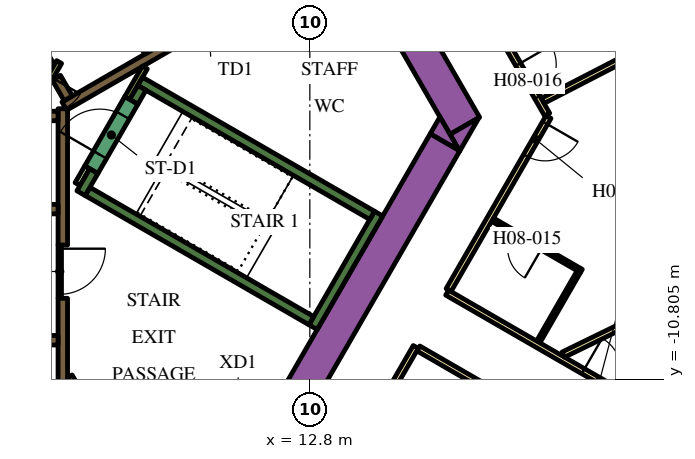
"""IFC4 building model, lengths in metres.
Left out: names, types, materials, properties, quantities, classifications, styles, units other than length and angle.
Written with IfcOpenShell. Run it as: python <this file> out.ifc"""

import sys

from ifc_helpers import new_model, si_unit, direction, frame, frame_2d, origin, place, context, subcontext, project, spatial, polyline, rectangle, outline, extrude, element, fill, save


model = new_model("IFC4")
c1 = context("Model", 3, precision=1e-05, world=origin(), true_north=direction((0.0, 1.0)))
c2 = subcontext(c1, "Body", "Model", "MODEL_VIEW")
j1 = project(units=[si_unit("LENGTHUNIT", "METRE"), si_unit("PLANEANGLEUNIT", "RADIAN")], contexts=[c1])
p1 = place(None, origin())
s1 = spatial("IfcSite", under=j1, at=p1, CompositionType="ELEMENT")
p2 = place(p1, origin())
s2 = spatial("IfcBuilding", under=s1, at=p2, CompositionType="ELEMENT")
p3 = place(p2, frame((0.0, 0.0, 114.9)))
s3 = spatial("IfcBuildingStorey", under=s2, at=p3, CompositionType="ELEMENT", Elevation=114.9)
p4 = place(p3, frame((6.776, 13.364, 0.0), z_axis=(0.0, 0.0, 1.0), x_axis=(0.500004177138, -0.8660229921, 0.0)))
e1 = element("IfcWall", 1, at=p4, inside=s3, PredefinedType="SOLIDWALL", context=c2, shape_type="SweptSolid", body=[
    extrude(rectangle(XDim=20.204, YDim=0.9, at=frame_2d((10.102, 0.0))), origin(), (0.0, 0.0, 1.0), 3.9),
])
p5 = place(p3, origin())
e2 = element("IfcWall", 2, at=p5, inside=s3, PredefinedType="SOLIDWALL", context=c2, shape_type="SweptSolid", body=[
    extrude(outline(polyline([(16.743, -4.8), (16.489, -4.36), (17.251, -3.92), (16.743, -4.8)])), origin(), (0.0, 0.0, 1.0), 3.9),
])
p6 = place(p3, frame((11.943, -12.214, 0.0), z_axis=(0.0, 0.0, 1.0), x_axis=(0.49998092645, 0.866036415623, 0.0)))
e3 = element("IfcWall", 3, at=p6, inside=s3, PredefinedType="SOLIDWALL", context=c2, shape_type="SweptSolid", body=[
    extrude(rectangle(XDim=8.83, YDim=0.9, at=frame_2d((4.415, 0.0))), origin(), (0.0, 0.0, 1.0), 3.9),
])
e4 = element("IfcWall", 4, at=p5, inside=s3, PredefinedType="SOLIDWALL", context=c2, shape_type="SweptSolid", body=[
    extrude(outline(polyline([(16.223, -3.9), (16.732, -4.78), (15.969, -4.34), (16.223, -3.9)])), origin(), (0.0, 0.0, 1.0), 3.9),
])
p7 = place(p3, frame((12.885, -9.431, 0.0), z_axis=(0.0, 0.0, 1.0), x_axis=(0.500020560727, 0.866013532718, 0.0)))
e5 = element("IfcWall", 5, at=p7, inside=s3, PredefinedType="SOLIDWALL", context=c2, shape_type="SweptSolid", body=[
    extrude(rectangle(XDim=3.45, YDim=0.25, at=frame_2d((1.725, 0.0))), origin(), (0.0, 0.0, 1.0), 3.9),
])
p8 = place(p3, frame((12.84, -9.261, 0.0), z_axis=(0.0, 0.0, 1.0), x_axis=(-0.866013990052, 0.500019768644, 0.0)))
e6 = element("IfcWall", 6, at=p8, inside=s3, PredefinedType="SOLIDWALL", context=c2, shape_type="SweptSolid", body=[
    extrude(rectangle(XDim=6.8, YDim=0.25, at=frame_2d((3.4, 0.0))), origin(), (0.0, 0.0, 1.0), 3.9),
])
p9 = place(p3, frame((6.78, -5.906, 0.0), z_axis=(0.0, 0.0, 1.0), x_axis=(0.500223362819, 0.865896406789, 0.0)))
e7 = element("IfcWall", 7, at=p9, inside=s3, PredefinedType="SOLIDWALL", context=c2, shape_type="SweptSolid", body=[
    extrude(rectangle(XDim=0.675, YDim=0.25, at=frame_2d((0.337, 0.0))), origin(), (0.0, 0.0, 1.0), 3.9),
])
p10 = place(p3, frame((8.334, -2.964, 0.0), z_axis=(0.0, 0.0, 1.0), x_axis=(0.866016039709, -0.500016218704, 0.0)))
e8 = element("IfcWall", 8, at=p10, inside=s3, PredefinedType="SOLIDWALL", context=c2, shape_type="SweptSolid", body=[
    extrude(rectangle(XDim=7.05, YDim=0.25, at=frame_2d((3.525, 0.0))), origin(), (0.0, 0.0, 1.0), 3.9),
])
p11 = place(p3, frame((8.168, -3.503, 0.0), z_axis=(0.0, 0.0, 1.0), x_axis=(0.49972245349, 0.866185586049, 0.0)))
e9 = element("IfcWall", 9, at=p11, inside=s3, PredefinedType="SOLIDWALL", context=c2, shape_type="SweptSolid", body=[
    extrude(rectangle(XDim=0.425, YDim=0.25, at=frame_2d((0.212, 0.0))), origin(), (0.0, 0.0, 1.0), 3.9),
])
p12 = place(p3, frame((6.3, -7.27, 0.0), z_axis=(0.0, 0.0, 1.0), x_axis=(0.0, 1.0, 0.0)))
e10 = element("IfcWall", 10, at=p12, inside=s3, PredefinedType="SOLIDWALL", context=c2, shape_type="SweptSolid", body=[
    extrude(rectangle(XDim=3.586, YDim=0.25, at=frame_2d((1.793, 0.0))), origin(), (0.0, 0.0, 1.0), 3.9),
])
p13 = place(p3, frame((6.3, -12.1, 0.0), z_axis=(0.0, 0.0, 1.0), x_axis=(0.0, 1.0, 0.0)))
e11 = element("IfcWall", 11, at=p13, inside=s3, PredefinedType="SOLIDWALL", context=c2, shape_type="SweptSolid", body=[
    extrude(rectangle(XDim=3.428, YDim=0.25, at=frame_2d((1.714, 0.0))), origin(), (0.0, 0.0, 1.0), 3.9),
])
p14 = place(p3, frame((5.538, -3.875, 0.0), z_axis=(0.0, 0.0, 1.0), x_axis=(1.0, 0.0, 0.0)))
e12 = element("IfcWall", 12, at=p14, inside=s3, PredefinedType="SOLIDWALL", context=c2, shape_type="SweptSolid", body=[
    extrude(rectangle(XDim=0.637, YDim=0.25, at=frame_2d((0.318, 0.0))), origin(), (0.0, 0.0, 1.0), 3.9),
])
p15 = place(p3, frame((9.346, -1.879, 0.0), z_axis=(0.0, 0.0, 1.0), x_axis=(-0.866048528039, -0.499959945477, 0.0)))
e13 = element("IfcWall", 13, at=p15, inside=s3, PredefinedType="SOLIDWALL", context=c2, shape_type="SweptSolid", body=[
    extrude(rectangle(XDim=3.47, YDim=0.25, at=frame_2d((1.735, 0.0))), origin(), (0.0, 0.0, 1.0), 3.9),
])
p16 = place(p3, frame((6.13, -2.867, 0.0), z_axis=(0.0, 0.0, 1.0), x_axis=(0.500160776593, -0.865932559475, 0.0)))
e14 = element("IfcWall", 14, at=p16, inside=s3, PredefinedType="SOLIDWALL", context=c2, shape_type="SweptSolid", body=[
    extrude(rectangle(XDim=0.627, YDim=0.25, at=frame_2d((0.313, 0.0))), origin(), (0.0, 0.0, 1.0), 3.9),
])
p17 = place(p3, frame((5.97, -2.591, 0.0), z_axis=(0.0, 0.0, 1.0), x_axis=(-0.499994469932, 0.866028596547, 0.0)))
e15 = element("IfcWall", 15, at=p17, inside=s3, PredefinedType="SOLIDWALL", context=c2, shape_type="SweptSolid", body=[
    extrude(rectangle(XDim=10.488, YDim=0.25, at=frame_2d((5.244, 0.0))), origin(), (0.0, 0.0, 1.0), 3.9),
])
p18 = place(p3, frame((6.48, -10.726, 0.0), z_axis=(0.0, 0.0, 1.0), x_axis=(0.500017819788, -0.86601511528, 0.0)))
e16 = element("IfcWall", 16, at=p18, inside=s3, PredefinedType="PARTITIONING", context=c2, shape_type="SweptSolid", body=[
    extrude(rectangle(XDim=1.55, YDim=0.15, at=frame_2d((0.775, 0.0))), origin(), (0.0, 0.0, 1.0), 2.75),
])
p19 = place(p3, frame((6.945, -5.222, 0.0), z_axis=(0.0, 0.0, 1.0), x_axis=(-0.499818422106, -0.866130212453, 0.0)))
e17 = element("IfcWall", 17, at=p19, inside=s3, PredefinedType="PARTITIONING", context=c2, shape_type="SweptSolid", body=[
    extrude(rectangle(XDim=0.514, YDim=0.15, at=frame_2d((0.257, 0.0))), origin(), (0.0, 0.0, 1.0), 2.75),
])
p20 = place(p3, frame((8.459, -2.599, 0.0), z_axis=(0.0, 0.0, 1.0), x_axis=(-0.500041054325, -0.866001699761, 0.0)))
e18 = element("IfcWall", 18, at=p20, inside=s3, PredefinedType="PARTITIONING", context=c2, shape_type="SweptSolid", body=[
    extrude(rectangle(XDim=0.929, YDim=0.15, at=frame_2d((0.464, 0.0))), origin(), (0.0, 0.0, 1.0), 3.9),
])
p21 = place(p3, frame((-6.175, -9.775, 0.0), z_axis=(0.0, 0.0, 1.0), x_axis=(1.0, 0.0, 0.0)))
e19 = element("IfcWall", 19, at=p21, inside=s3, PredefinedType="SOLIDWALL", context=c2, shape_type="SweptSolid", body=[
    extrude(rectangle(XDim=12.35, YDim=0.25, at=frame_2d((6.175, 0.0))), origin(), (0.0, 0.0, 1.0), 3.9),
])
p22 = place(p21, frame((0.585, 0.0, 0.0)))
e20 = element("IfcOpeningElement", 20, at=p22, cuts=e19, PredefinedType="OPENING", context=c2, shape_type="SweptSolid", body=[
    extrude(rectangle(XDim=1.1, YDim=2.1, at=frame_2d((0.55, 1.05))), frame((0.0, 0.135, 0.0), z_axis=(0.0, -1.0, 0.0), x_axis=(1.0, 0.0, 0.0)), (0.0, 0.0, 1.0), 0.27),
])
p23 = place(p21, frame((3.105, 0.0, 0.0)))
e21 = element("IfcOpeningElement", 21, at=p23, cuts=e19, PredefinedType="OPENING", context=c2, shape_type="SweptSolid", body=[
    extrude(rectangle(XDim=1.1, YDim=2.1, at=frame_2d((0.55, 1.05))), frame((0.0, 0.135, 0.0), z_axis=(0.0, -1.0, 0.0), x_axis=(1.0, 0.0, 0.0)), (0.0, 0.0, 1.0), 0.27),
])
p24 = place(p21, frame((5.625, 0.0, 0.0)))
e22 = element("IfcOpeningElement", 22, at=p24, cuts=e19, PredefinedType="OPENING", context=c2, shape_type="SweptSolid", body=[
    extrude(rectangle(XDim=1.1, YDim=2.1, at=frame_2d((0.55, 1.05))), frame((0.0, 0.135, 0.0), z_axis=(0.0, -1.0, 0.0), x_axis=(1.0, 0.0, 0.0)), (0.0, 0.0, 1.0), 0.27),
])
p25 = place(p21, frame((8.145, 0.0, 0.0)))
e23 = element("IfcOpeningElement", 23, at=p25, cuts=e19, PredefinedType="OPENING", context=c2, shape_type="SweptSolid", body=[
    extrude(rectangle(XDim=1.1, YDim=2.1, at=frame_2d((0.55, 1.05))), frame((0.0, 0.135, 0.0), z_axis=(0.0, -1.0, 0.0), x_axis=(1.0, 0.0, 0.0)), (0.0, 0.0, 1.0), 0.27),
])
p26 = place(p21, frame((10.665, 0.0, 0.0)))
e24 = element("IfcOpeningElement", 24, at=p26, cuts=e19, PredefinedType="OPENING", context=c2, shape_type="SweptSolid", body=[
    extrude(rectangle(XDim=1.1, YDim=2.1, at=frame_2d((0.55, 1.05))), frame((0.0, 0.135, 0.0), z_axis=(0.0, -1.0, 0.0), x_axis=(1.0, 0.0, 0.0)), (0.0, 0.0, 1.0), 0.27),
])
p27 = place(p3, frame((-6.175, -6.325, 0.0), z_axis=(0.0, 0.0, 1.0), x_axis=(1.0, 0.0, 0.0)))
e25 = element("IfcWall", 25, at=p27, inside=s3, PredefinedType="SOLIDWALL", context=c2, shape_type="SweptSolid", body=[
    extrude(rectangle(XDim=12.35, YDim=0.25, at=frame_2d((6.175, 0.0))), origin(), (0.0, 0.0, 1.0), 3.9),
])
p28 = place(p27, frame((3.205, 0.0, 0.0)))
e26 = element("IfcOpeningElement", 26, at=p28, cuts=e25, PredefinedType="OPENING", context=c2, shape_type="SweptSolid", body=[
    extrude(rectangle(XDim=0.9, YDim=2.1, at=frame_2d((0.45, 1.05))), frame((0.0, 0.135, 0.0), z_axis=(0.0, -1.0, 0.0), x_axis=(1.0, 0.0, 0.0)), (0.0, 0.0, 1.0), 0.27),
])
p29 = place(p27, frame((8.145, 0.0, 0.0)))
e27 = element("IfcOpeningElement", 27, at=p29, cuts=e25, PredefinedType="OPENING", context=c2, shape_type="SweptSolid", body=[
    extrude(rectangle(XDim=1.1, YDim=2.1, at=frame_2d((0.55, 1.05))), frame((0.0, 0.135, 0.0), z_axis=(0.0, -1.0, 0.0), x_axis=(1.0, 0.0, 0.0)), (0.0, 0.0, 1.0), 0.27),
])
p30 = place(p27, frame((10.665, 0.0, 0.0)))
e28 = element("IfcOpeningElement", 28, at=p30, cuts=e25, PredefinedType="OPENING", context=c2, shape_type="SweptSolid", body=[
    extrude(rectangle(XDim=1.1, YDim=2.1, at=frame_2d((0.55, 1.05))), frame((0.0, 0.135, 0.0), z_axis=(0.0, -1.0, 0.0), x_axis=(1.0, 0.0, 0.0)), (0.0, 0.0, 1.0), 0.27),
])
p31 = place(p3, frame((8.565, -2.185, 0.0), z_axis=(0.0, 0.0, 1.0), x_axis=(-0.499997954832, 0.866026584559, 0.0)))
e29 = element("IfcWall", 29, at=p31, inside=s3, PredefinedType="SOLIDWALL", context=c2, shape_type="SweptSolid", body=[
    extrude(rectangle(XDim=12.35, YDim=0.25, at=frame_2d((6.175, 0.0))), origin(), (0.0, 0.0, 1.0), 3.9),
])
p32 = place(p31, frame((5.725, 0.0, 0.0)))
e30 = element("IfcOpeningElement", 30, at=p32, cuts=e29, PredefinedType="OPENING", context=c2, shape_type="SweptSolid", body=[
    extrude(rectangle(XDim=0.9, YDim=2.1, at=frame_2d((0.45, 1.05))), frame((0.0, 0.135, 0.0), z_axis=(0.0, -1.0, 0.0), x_axis=(1.0, 0.0, 0.0)), (0.0, 0.0, 1.0), 0.27),
])
p33 = place(p3, frame((7.053, -5.284, 0.0), z_axis=(0.0, 0.0, 1.0), x_axis=(0.500078061341, 0.865980330357, 0.0)))
e31 = element("IfcWall", 31, at=p33, inside=s3, PredefinedType="SOLIDWALL", context=c2, shape_type="SweptSolid", body=[
    extrude(rectangle(XDim=2.1, YDim=0.4, at=frame_2d((1.05, 0.0))), origin(), (0.0, 0.0, 1.0), 3.9),
])
p34 = place(p33, frame((0.45, 0.0, 0.0)))
e32 = element("IfcOpeningElement", 32, at=p34, cuts=e31, PredefinedType="OPENING", context=c2, shape_type="SweptSolid", body=[
    extrude(rectangle(XDim=1.2, YDim=2.1, at=frame_2d((0.6, 1.05))), frame((0.0, 0.21, 0.0), z_axis=(0.0, -1.0, 0.0), x_axis=(1.0, 0.0, 0.0)), (0.0, 0.0, 1.0), 0.42),
])
p35 = place(p3, frame((6.203, -2.456, 0.0), z_axis=(0.0, 0.0, 1.0), x_axis=(-0.500043961785, -0.866000020948, 0.0)))
e33 = element("IfcWall", 33, at=p35, inside=s3, PredefinedType="PARTITIONING", context=c2, shape_type="SweptSolid", body=[
    extrude(rectangle(XDim=1.95, YDim=0.15, at=frame_2d((0.975, 0.0))), origin(), (0.0, 0.0, 1.0), 3.9),
])
p36 = place(p35, frame((0.45, 0.0, 0.0)))
e34 = element("IfcOpeningElement", 34, at=p36, cuts=e33, PredefinedType="OPENING", context=c2, shape_type="SweptSolid", body=[
    extrude(rectangle(XDim=0.9, YDim=2.1, at=frame_2d((0.45, 1.05))), frame((0.0, 0.085, 0.0), z_axis=(0.0, -1.0, 0.0), x_axis=(1.0, 0.0, 0.0)), (0.0, 0.0, 1.0), 0.17),
])
p37 = place(p3, frame((6.22, -7.266, 0.0), z_axis=(0.0, 0.0, 1.0), x_axis=(0.0, -1.0, 0.0)))
e35 = element("IfcWall", 35, at=p37, inside=s3, PredefinedType="PARTITIONING", context=c2, shape_type="SweptSolid", body=[
    extrude(rectangle(XDim=1.4, YDim=0.09, at=frame_2d((0.7, 0.0))), origin(), (0.0, 0.0, 1.0), 2.75),
])
p38 = place(p37, frame((0.1, 0.0, 0.0)))
e36 = element("IfcOpeningElement", 36, at=p38, cuts=e35, PredefinedType="OPENING", context=c2, shape_type="SweptSolid", body=[
    extrude(rectangle(XDim=1.2, YDim=2.1, at=frame_2d((0.6, 1.05))), frame((0.0, 0.055, 0.0), z_axis=(0.0, -1.0, 0.0), x_axis=(1.0, 0.0, 0.0)), (0.0, 0.0, 1.0), 0.11),
])
p39 = place(p3, frame((16.412, -8.523, 0.0), z_axis=(0.0, 0.0, 1.0), x_axis=(0.866025629663, -0.499999608766, 0.0)))
e37 = element("IfcWall", 37, at=p39, inside=s3, PredefinedType="PARTITIONING", context=c2, shape_type="SweptSolid", body=[
    extrude(rectangle(XDim=13.624, YDim=0.15, at=frame_2d((6.812, 0.0))), origin(), (0.0, 0.0, 1.0), 2.75),
])
p40 = place(p39, frame((4.134, 0.0, 0.0)))
e38 = element("IfcOpeningElement", 38, at=p40, cuts=e37, PredefinedType="OPENING", context=c2, shape_type="SweptSolid", body=[
    extrude(rectangle(XDim=1.0, YDim=2.1, at=frame_2d((0.5, 1.05))), frame((0.0, 0.085, 0.0), z_axis=(0.0, -1.0, 0.0), x_axis=(1.0, 0.0, 0.0)), (0.0, 0.0, 1.0), 0.17),
])
p41 = place(p3, frame((19.081, -3.9, 0.0), z_axis=(0.0, 0.0, 1.0), x_axis=(-0.499974327079, -0.866040225545, 0.0)))
e39 = element("IfcWall", 39, at=p41, inside=s3, PredefinedType="PARTITIONING", context=c2, shape_type="SweptSolid", body=[
    extrude(rectangle(XDim=5.258, YDim=0.15, at=frame_2d((2.629, 0.0))), origin(), (0.0, 0.0, 1.0), 2.75),
])
p42 = place(p41, frame((0.18, 0.0, 0.0)))
e40 = element("IfcOpeningElement", 40, at=p42, cuts=e39, PredefinedType="OPENING", context=c2, shape_type="SweptSolid", body=[
    extrude(rectangle(XDim=1.0, YDim=2.1, at=frame_2d((0.5, 1.05))), frame((0.0, 0.085, 0.0), z_axis=(0.0, -1.0, 0.0), x_axis=(1.0, 0.0, 0.0)), (0.0, 0.0, 1.0), 0.17),
])
p43 = place(p3, frame((6.163, 18.475, 0.0), z_axis=(0.0, 0.0, 1.0), x_axis=(0.500001317485, -0.866024643133, 0.0)))
e41 = element("IfcWall", 41, at=p43, inside=s3, PredefinedType="PARTITIONING", context=c2, shape_type="SweptSolid", body=[
    extrude(rectangle(XDim=25.767, YDim=0.15, at=frame_2d((12.883, 0.0))), origin(), (0.0, 0.0, 1.0), 2.75),
])
p44 = place(p43, frame((24.241, 0.0, 0.0)))
e42 = element("IfcOpeningElement", 42, at=p44, cuts=e41, PredefinedType="OPENING", context=c2, shape_type="SweptSolid", body=[
    extrude(rectangle(XDim=1.0, YDim=2.1, at=frame_2d((0.5, 1.05))), frame((0.0, 0.085, 0.0), z_axis=(0.0, -1.0, 0.0), x_axis=(1.0, 0.0, 0.0)), (0.0, 0.0, 1.0), 0.17),
])
p45 = place(p43, frame((13.144, 0.0, 0.0)))
e43 = element("IfcOpeningElement", 43, at=p45, cuts=e41, PredefinedType="OPENING", context=c2, shape_type="SweptSolid", body=[
    extrude(rectangle(XDim=1.0, YDim=2.1, at=frame_2d((0.5, 1.05))), frame((0.0, 0.085, 0.0), z_axis=(0.0, -1.0, 0.0), x_axis=(1.0, 0.0, 0.0)), (0.0, 0.0, 1.0), 0.17),
])
p46 = place(p43, frame((10.874, 0.0, 0.0)))
e44 = element("IfcOpeningElement", 44, at=p46, cuts=e41, PredefinedType="OPENING", context=c2, shape_type="SweptSolid", body=[
    extrude(rectangle(XDim=0.9, YDim=2.1, at=frame_2d((0.45, 1.05))), frame((0.0, 0.085, 0.0), z_axis=(0.0, -1.0, 0.0), x_axis=(1.0, 0.0, 0.0)), (0.0, 0.0, 1.0), 0.17),
])
p47 = place(p43, frame((3.718, 0.0, 0.0)))
e45 = element("IfcOpeningElement", 45, at=p47, cuts=e41, PredefinedType="OPENING", context=c2, shape_type="SweptSolid", body=[
    extrude(rectangle(XDim=1.0, YDim=2.1, at=frame_2d((0.5, 1.05))), frame((0.0, 0.085, 0.0), z_axis=(0.0, -1.0, 0.0), x_axis=(1.0, 0.0, 0.0)), (0.0, 0.0, 1.0), 0.17),
])
p48 = place(p43, frame((2.411, 0.0, 0.0)))
e46 = element("IfcOpeningElement", 46, at=p48, cuts=e41, PredefinedType="OPENING", context=c2, shape_type="SweptSolid", body=[
    extrude(rectangle(XDim=1.0, YDim=2.1, at=frame_2d((0.5, 1.05))), frame((0.0, 0.085, 0.0), z_axis=(0.0, -1.0, 0.0), x_axis=(1.0, 0.0, 0.0)), (0.0, 0.0, 1.0), 0.17),
])
p49 = place(p3, frame((15.587, -9.952, 0.0), z_axis=(0.0, 0.0, 1.0), x_axis=(-0.500016618951, -0.866015808616, 0.0)))
e47 = element("IfcWall", 47, at=p49, inside=s3, PredefinedType="PARTITIONING", context=c2, shape_type="SweptSolid", body=[
    extrude(rectangle(XDim=5.268, YDim=0.15, at=frame_2d((2.634, 0.0))), origin(), (0.0, 0.0, 1.0), 2.75),
])
p50 = place(p3, frame((27.386, -16.764, 0.0), z_axis=(0.0, 0.0, 1.0), x_axis=(-0.866022585856, 0.500004880763, 0.0)))
e48 = element("IfcWall", 48, at=p50, inside=s3, PredefinedType="PARTITIONING", context=c2, shape_type="SweptSolid", body=[
    extrude(rectangle(XDim=13.544, YDim=0.15, at=frame_2d((6.772, 0.0))), origin(), (0.0, 0.0, 1.0), 2.75),
])
p51 = place(p50, frame((9.447, 0.0, 0.0)))
e49 = element("IfcOpeningElement", 49, at=p51, cuts=e48, PredefinedType="OPENING", context=c2, shape_type="SweptSolid", body=[
    extrude(rectangle(XDim=1.0, YDim=2.1, at=frame_2d((0.5, 1.05))), frame((0.0, 0.085, 0.0), z_axis=(0.0, -1.0, 0.0), x_axis=(1.0, 0.0, 0.0)), (0.0, 0.0, 1.0), 0.17),
])
p52 = place(p50, frame((3.926, 0.0, 0.0)))
e50 = element("IfcOpeningElement", 50, at=p52, cuts=e48, PredefinedType="OPENING", context=c2, shape_type="SweptSolid", body=[
    extrude(rectangle(XDim=0.9, YDim=2.1, at=frame_2d((0.45, 1.05))), frame((0.0, 0.085, 0.0), z_axis=(0.0, -1.0, 0.0), x_axis=(1.0, 0.0, 0.0)), (0.0, 0.0, 1.0), 0.17),
])
p53 = place(p3, frame((24.613, -0.541, 0.0), z_axis=(0.0, 0.0, 1.0), x_axis=(-0.888459912519, -0.458954228487, 0.0)))
e51 = element("IfcWall", 51, at=p53, inside=s3, PredefinedType="PARTITIONING", context=c2, shape_type="SweptSolid", body=[
    extrude(rectangle(XDim=6.392, YDim=0.15, at=frame_2d((3.196, 0.0))), origin(), (0.0, 0.0, 1.0), 2.75),
])
p54 = place(p3, frame((27.478, -6.251, 0.0), z_axis=(0.0, 0.0, 1.0), x_axis=(-0.898940618603, -0.438070501432, 0.0)))
e52 = element("IfcWall", 52, at=p54, inside=s3, PredefinedType="PARTITIONING", context=c2, shape_type="SweptSolid", body=[
    extrude(rectangle(XDim=8.909, YDim=0.15, at=frame_2d((4.455, 0.0))), origin(), (0.0, 0.0, 1.0), 2.75),
])
p55 = place(p3, frame((19.946, -7.953, 0.0), z_axis=(0.0, 0.0, 1.0), x_axis=(-0.86599734893, 0.500048589285, 0.0)))
e53 = element("IfcWall", 53, at=p55, inside=s3, PredefinedType="PARTITIONING", context=c2, shape_type="SweptSolid", body=[
    extrude(rectangle(XDim=2.7, YDim=0.1, at=frame_2d((1.35, 0.0))), origin(), (0.0, 0.0, 1.0), 2.75),
])
p56 = place(p55, frame((1.2, 0.0, 0.0)))
e54 = element("IfcOpeningElement", 54, at=p56, cuts=e53, PredefinedType="OPENING", context=c2, shape_type="SweptSolid", body=[
    extrude(rectangle(XDim=0.9, YDim=2.1, at=frame_2d((0.45, 1.05))), frame((0.0, 0.06, 0.0), z_axis=(0.0, -1.0, 0.0), x_axis=(1.0, 0.0, 0.0)), (0.0, 0.0, 1.0), 0.12),
])
p57 = place(p3, frame((19.877, -7.972, 0.0), z_axis=(0.0, 0.0, 1.0), x_axis=(-0.500010206181, -0.866019511163, 0.0)))
e55 = element("IfcWall", 55, at=p57, inside=s3, PredefinedType="PARTITIONING", context=c2, shape_type="SweptSolid", body=[
    extrude(rectangle(XDim=2.13, YDim=0.1, at=frame_2d((1.065, 0.0))), origin(), (0.0, 0.0, 1.0), 2.75),
])
p58 = place(p34, origin())
e56 = element("IfcDoor", 56, at=p58, inside=s3, OperationType="SINGLE_SWING_LEFT", PredefinedType="DOOR", context=c2, shape_type="SweptSolid", body=[
    extrude(rectangle(XDim=1.2, YDim=2.1, at=frame_2d((0.6, 1.05))), frame((0.0, 0.025, 0.0), z_axis=(0.0, -1.0, 0.0), x_axis=(1.0, 0.0, 0.0)), (0.0, 0.0, 1.0), 0.05),
])
fill(e32, e56)
p59 = place(p38, origin())
e57 = element("IfcDoor", 57, at=p59, inside=s3, OperationType="SINGLE_SWING_LEFT", PredefinedType="DOOR", context=c2, shape_type="SweptSolid", body=[
    extrude(rectangle(XDim=1.2, YDim=2.1, at=frame_2d((0.6, 1.05))), frame((0.0, 0.025, 0.0), z_axis=(0.0, -1.0, 0.0), x_axis=(1.0, 0.0, 0.0)), (0.0, 0.0, 1.0), 0.05),
])
fill(e36, e57)
p60 = place(p40, origin())
e58 = element("IfcDoor", 58, at=p60, inside=s3, OperationType="SINGLE_SWING_LEFT", PredefinedType="DOOR", context=c2, shape_type="SweptSolid", body=[
    extrude(rectangle(XDim=1.0, YDim=2.1, at=frame_2d((0.5, 1.05))), frame((0.0, 0.025, 0.0), z_axis=(0.0, -1.0, 0.0), x_axis=(1.0, 0.0, 0.0)), (0.0, 0.0, 1.0), 0.05),
])
fill(e38, e58)
p61 = place(p42, origin())
e59 = element("IfcDoor", 59, at=p61, inside=s3, OperationType="SINGLE_SWING_LEFT", PredefinedType="DOOR", context=c2, shape_type="SweptSolid", body=[
    extrude(rectangle(XDim=1.0, YDim=2.1, at=frame_2d((0.5, 1.05))), frame((0.0, 0.025, 0.0), z_axis=(0.0, -1.0, 0.0), x_axis=(1.0, 0.0, 0.0)), (0.0, 0.0, 1.0), 0.05),
])
fill(e40, e59)
p62 = place(p56, origin())
e60 = element("IfcDoor", 60, at=p62, inside=s3, OperationType="SINGLE_SWING_RIGHT", PredefinedType="DOOR", context=c2, shape_type="SweptSolid", body=[
    extrude(rectangle(XDim=0.9, YDim=2.1, at=frame_2d((0.45, 1.05))), frame((0.0, 0.025, 0.0), z_axis=(0.0, -1.0, 0.0), x_axis=(1.0, 0.0, 0.0)), (0.0, 0.0, 1.0), 0.05),
])
fill(e54, e60)
p63 = place(p44, origin())
e61 = element("IfcDoor", 61, at=p63, inside=s3, OperationType="SINGLE_SWING_RIGHT", PredefinedType="DOOR", context=c2, shape_type="SweptSolid", body=[
    extrude(rectangle(XDim=1.0, YDim=2.1, at=frame_2d((0.5, 1.05))), frame((0.0, 0.025, 0.0), z_axis=(0.0, -1.0, 0.0), x_axis=(1.0, 0.0, 0.0)), (0.0, 0.0, 1.0), 0.05),
])
fill(e42, e61)
save(model, sys.argv[1])
